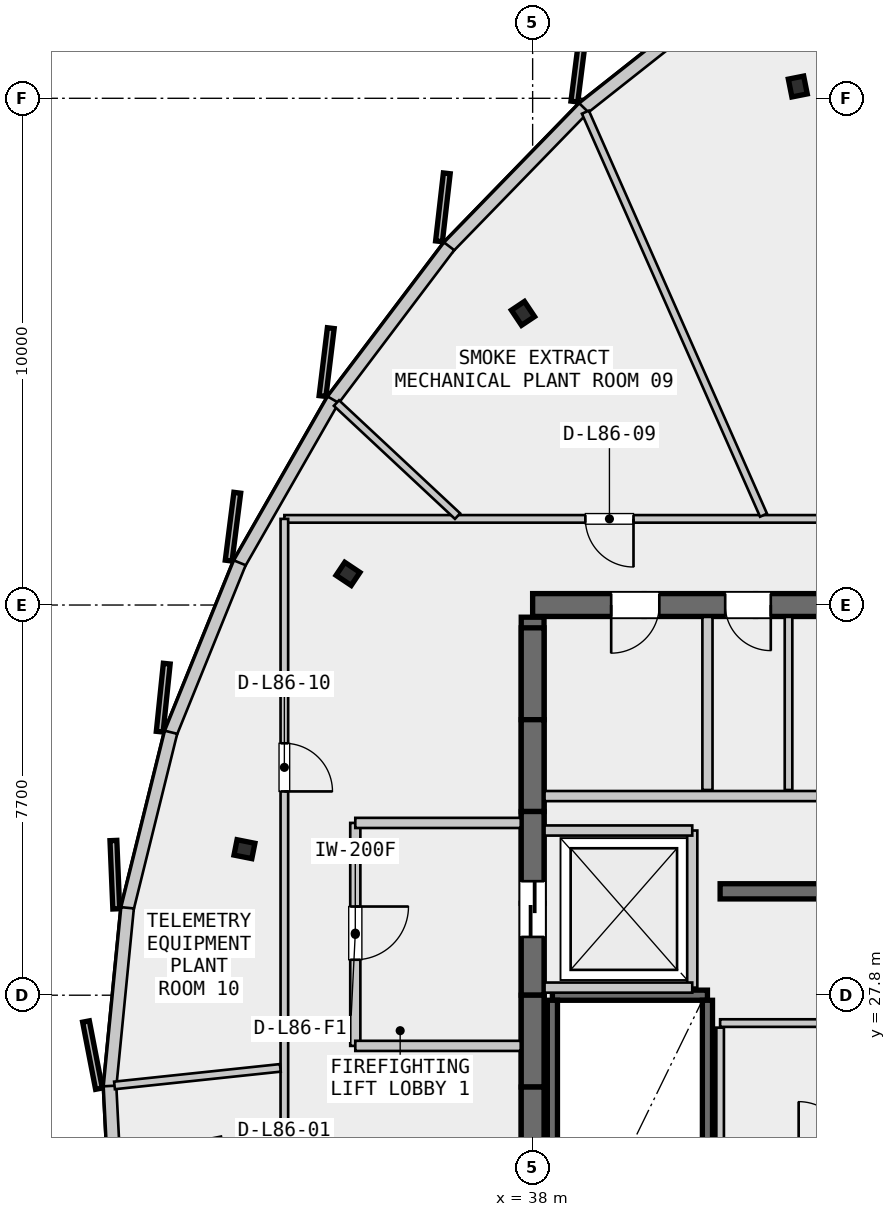
"""IFC4 building model, lengths in metres.
Left out: names, types, materials, properties, quantities, classifications, styles, units other than length and angle.
Written with IfcOpenShell. Run it as: python <this file> out.ifc"""

import sys

from ifc_helpers import new_model, si_unit, direction, frame, frame_2d, origin, origin_2d, place, context, subcontext, project, spatial, rectangle, i_section, extrude, source, transform, mapped, element, fill, save


model = new_model("IFC4")
c1 = context("Model", 3, precision=1e-05, world=origin(), true_north=direction((0.0, 1.0)))
c2 = subcontext(c1, "Body", "Model", "MODEL_VIEW")
j1 = project(units=[si_unit("LENGTHUNIT", "METRE"), si_unit("PLANEANGLEUNIT", "RADIAN")], contexts=[c1])
p1 = place(None, origin())
s1 = spatial("IfcSite", under=j1, at=p1, CompositionType="ELEMENT")
p2 = place(p1, origin())
s2 = spatial("IfcBuilding", under=s1, at=p2, CompositionType="ELEMENT")
p3 = place(p2, frame((0.0, 0.0, 324.3)))
s3 = spatial("IfcBuildingStorey", under=s2, at=p3, CompositionType="ELEMENT", Elevation=324.3)
p4 = place(p3, frame((55.6, 35.5, 0.0), z_axis=(0.0, 0.0, 1.0), x_axis=(-1.0, 0.0, 0.0)))
e1 = element("IfcWall", 1, at=p4, inside=s3, PredefinedType="SHEAR", context=c2, shape_type="SweptSolid", body=[
    extrude(rectangle(XDim=17.6, YDim=0.45, at=frame_2d((8.8, 0.0))), origin(), (0.0, 0.0, 1.0), 4.2),
])
p5 = place(p4, frame((8.05, 0.0, 0.0)))
e2 = element("IfcOpeningElement", 2, at=p5, cuts=e1, PredefinedType="OPENING", context=c2, shape_type="SweptSolid", body=[
    extrude(rectangle(XDim=1.5, YDim=2.2, at=frame_2d((0.75, 1.1))), frame((0.0, 0.235, 0.0), z_axis=(0.0, -1.0, 0.0), x_axis=(1.0, 0.0, 0.0)), (0.0, 0.0, 1.0), 0.47),
])
p6 = place(p4, frame((15.1, 0.0, 0.0)))
e3 = element("IfcOpeningElement", 3, at=p6, cuts=e1, PredefinedType="OPENING", context=c2, shape_type="SweptSolid", body=[
    extrude(rectangle(XDim=0.95, YDim=2.15, at=frame_2d((0.475, 1.075))), frame((0.0, 0.235, 0.0), z_axis=(0.0, -1.0, 0.0), x_axis=(1.0, 0.0, 0.0)), (0.0, 0.0, 1.0), 0.47),
])
p7 = place(p4, frame((12.9, 0.0, 0.0)))
e4 = element("IfcOpeningElement", 4, at=p7, cuts=e1, PredefinedType="OPENING", context=c2, shape_type="SweptSolid", body=[
    extrude(rectangle(XDim=0.9, YDim=2.15, at=frame_2d((0.45, 1.075))), frame((0.0, 0.235, 0.0), z_axis=(0.0, -1.0, 0.0), x_axis=(1.0, 0.0, 0.0)), (0.0, 0.0, 1.0), 0.47),
])
p8 = place(p4, frame((10.6, 0.0, 0.0)))
e5 = element("IfcOpeningElement", 5, at=p8, cuts=e1, PredefinedType="OPENING", context=c2, shape_type="SweptSolid", body=[
    extrude(rectangle(XDim=0.95, YDim=2.15, at=frame_2d((0.475, 1.075))), frame((0.0, 0.235, 0.0), z_axis=(0.0, -1.0, 0.0), x_axis=(1.0, 0.0, 0.0)), (0.0, 0.0, 1.0), 0.47),
])
p9 = place(p3, frame((38.0, 35.26, 0.0), z_axis=(0.0, 0.0, 1.0), x_axis=(0.0, -1.0, 0.0)))
e6 = element("IfcWall", 6, at=p9, inside=s3, PredefinedType="SHEAR", context=c2, shape_type="SweptSolid", body=[
    extrude(rectangle(XDim=14.92, YDim=0.45, at=frame_2d((7.46, 0.0))), origin(), (0.0, 0.0, 1.0), 4.2),
])
p10 = place(p9, frame((5.21, 0.0, 0.0)))
e7 = element("IfcOpeningElement", 7, at=p10, cuts=e6, PredefinedType="OPENING", context=c2, shape_type="SweptSolid", body=[
    extrude(rectangle(XDim=1.1, YDim=2.2, at=frame_2d((0.55, 1.1))), frame((0.0, 0.235, 0.0), z_axis=(0.0, -1.0, 0.0), x_axis=(1.0, 0.0, 0.0)), (0.0, 0.0, 1.0), 0.47),
])
p11 = place(p3, frame((41.7, 29.85, 0.0), z_axis=(0.0, 0.0, 1.0), x_axis=(1.0, 0.0, 0.0)))
e8 = element("IfcWall", 8, at=p11, inside=s3, PredefinedType="SHEAR", context=c2, shape_type="SweptSolid", body=[
    extrude(rectangle(XDim=4.25, YDim=0.3, at=frame_2d((2.125, 0.0))), origin(), (0.0, 0.0, 1.0), 4.2),
])
m1 = source(origin(), c2, "Body", "SweptSolid", [
    extrude(i_section(OverallWidth=0.309, OverallDepth=0.359, WebThickness=0.016, FlangeThickness=0.026, FilletRadius=0.027, at=origin_2d()), origin(), (0.0, 0.0, 1.0), 10.751),
])
p12 = place(p3, frame((43.233, 45.732, 0.0), z_axis=(0.0, 0.0, 1.0), x_axis=(-0.195090322016, 0.980785280403, 0.0)))
e9 = element("IfcColumn", 9, at=p12, inside=s3, PredefinedType="COLUMN", context=c2, shape_type="MappedRepresentation", body=[
    mapped(m1, transform((0.0, 0.0, 0.0), scale=1.0)),
])
m2 = source(origin(), c2, "Body", "SweptSolid", [
    extrude(i_section(OverallWidth=0.309, OverallDepth=0.359, WebThickness=0.016, FlangeThickness=0.026, FilletRadius=0.027, at=origin_2d()), origin(), (0.0, 0.0, 1.0), 9.653),
])
p13 = place(p3, frame((37.81, 41.255, 0.0), z_axis=(0.0, 0.0, 1.0), x_axis=(-0.55557023302, 0.831469612303, 0.0)))
e10 = element("IfcColumn", 10, at=p13, inside=s3, PredefinedType="COLUMN", context=c2, shape_type="MappedRepresentation", body=[
    mapped(m2, transform((0.0, 0.0, 0.0), scale=1.0)),
])
m3 = source(origin(), c2, "Body", "SweptSolid", [
    extrude(i_section(OverallWidth=0.309, OverallDepth=0.359, WebThickness=0.016, FlangeThickness=0.026, FilletRadius=0.027, at=origin_2d()), origin(), (0.0, 0.0, 1.0), 8.552),
])
p14 = place(p3, frame((34.356, 36.115, 0.0), z_axis=(0.0, 0.0, 1.0), x_axis=(-0.831469612303, 0.55557023302, 0.0)))
e11 = element("IfcColumn", 11, at=p14, inside=s3, PredefinedType="COLUMN", context=c2, shape_type="MappedRepresentation", body=[
    mapped(m3, transform((0.0, 0.0, 0.0), scale=1.0)),
])
m4 = source(origin(), c2, "Body", "SweptSolid", [
    extrude(i_section(OverallWidth=0.309, OverallDepth=0.359, WebThickness=0.016, FlangeThickness=0.026, FilletRadius=0.027, at=origin_2d()), origin(), (0.0, 0.0, 1.0), 7.479),
])
p15 = place(p3, frame((32.312, 30.682, 0.0), z_axis=(0.0, 0.0, 1.0), x_axis=(-0.980785280403, 0.195090322016, 0.0)))
e12 = element("IfcColumn", 12, at=p15, inside=s3, PredefinedType="COLUMN", context=c2, shape_type="MappedRepresentation", body=[
    mapped(m4, transform((0.0, 0.0, 0.0), scale=1.0)),
])
p16 = place(p3, frame((44.6, 35.5, 4.2), z_axis=(0.0, 0.0, 1.0), x_axis=(-1.0, 0.0, 0.0)))
e13 = element("IfcWall", 13, at=p16, inside=s3, PredefinedType="SHEAR", context=c2, shape_type="SweptSolid", body=[
    extrude(rectangle(XDim=2.2, YDim=0.45, at=frame_2d((1.1, 0.0))), origin(), (0.0, 0.0, 1.0), 4.713),
])
p17 = place(p3, frame((42.4, 35.5, 4.2), z_axis=(0.0, 0.0, 1.0), x_axis=(-1.0, 0.0, 0.0)))
e14 = element("IfcWall", 14, at=p17, inside=s3, PredefinedType="SHEAR", context=c2, shape_type="SweptSolid", body=[
    extrude(rectangle(XDim=2.2, YDim=0.45, at=frame_2d((1.1, 0.0))), origin(), (0.0, 0.0, 1.0), 4.587),
])
p18 = place(p3, frame((40.2, 35.5, 4.2), z_axis=(0.0, 0.0, 1.0), x_axis=(-1.0, 0.0, 0.0)))
e15 = element("IfcWall", 15, at=p18, inside=s3, PredefinedType="SHEAR", context=c2, shape_type="SweptSolid", body=[
    extrude(rectangle(XDim=2.2, YDim=0.45, at=frame_2d((1.1, 0.0))), origin(), (0.0, 0.0, 1.0), 4.462),
])
p19 = place(p3, frame((38.0, 35.05, 4.2), z_axis=(0.0, 0.0, 1.0), x_axis=(0.0, -1.0, 0.0)))
e16 = element("IfcWall", 16, at=p19, inside=s3, PredefinedType="SHEAR", context=c2, shape_type="SweptSolid", body=[
    extrude(rectangle(XDim=1.812, YDim=0.45, at=frame_2d((0.906, 0.0))), origin(), (0.0, 0.0, 1.0), 4.064),
])
p20 = place(p3, frame((38.0, 33.238, 4.2), z_axis=(0.0, 0.0, 1.0), x_axis=(0.0, -1.0, 0.0)))
e17 = element("IfcWall", 17, at=p20, inside=s3, PredefinedType="SHEAR", context=c2, shape_type="SweptSolid", body=[
    extrude(rectangle(XDim=1.812, YDim=0.45, at=frame_2d((0.906, 0.0))), origin(), (0.0, 0.0, 1.0), 3.745),
])
p21 = place(p3, frame((38.0, 31.425, 4.2), z_axis=(0.0, 0.0, 1.0), x_axis=(0.0, -1.0, 0.0)))
e18 = element("IfcWall", 18, at=p21, inside=s3, PredefinedType="SHEAR", context=c2, shape_type="SweptSolid", body=[
    extrude(rectangle(XDim=1.812, YDim=0.45, at=frame_2d((0.906, 0.0))), origin(), (0.0, 0.0, 1.0), 3.426),
])
p22 = place(p3, frame((38.0, 29.613, 4.2), z_axis=(0.0, 0.0, 1.0), x_axis=(0.0, -1.0, 0.0)))
e19 = element("IfcWall", 19, at=p22, inside=s3, PredefinedType="SHEAR", context=c2, shape_type="SweptSolid", body=[
    extrude(rectangle(XDim=1.812, YDim=0.45, at=frame_2d((0.906, 0.0))), origin(), (0.0, 0.0, 1.0), 3.107),
])
p23 = place(p3, frame((38.0, 27.8, 4.2), z_axis=(0.0, 0.0, 1.0), x_axis=(0.0, -1.0, 0.0)))
e20 = element("IfcWall", 20, at=p23, inside=s3, PredefinedType="SHEAR", context=c2, shape_type="SweptSolid", body=[
    extrude(rectangle(XDim=1.812, YDim=0.45, at=frame_2d((0.906, 0.0))), origin(), (0.0, 0.0, 1.0), 2.788),
])
p24 = place(p3, frame((38.0, 25.988, 4.2), z_axis=(0.0, 0.0, 1.0), x_axis=(0.0, -1.0, 0.0)))
e21 = element("IfcWall", 21, at=p24, inside=s3, PredefinedType="SHEAR", context=c2, shape_type="SweptSolid", body=[
    extrude(rectangle(XDim=1.812, YDim=0.45, at=frame_2d((0.906, 0.0))), origin(), (0.0, 0.0, 1.0), 2.469),
])
p25 = place(p3, frame((41.944, 47.628, 10.458), z_axis=(0.0, 0.0, 1.0), x_axis=(-0.784641383656, -0.619949916569, 0.0)))
e22 = element("IfcWall", 22, at=p25, inside=s3, PredefinedType="PARAPET", context=c2, shape_type="SweptSolid", body=[
    extrude(rectangle(XDim=3.755, YDim=0.25, at=frame_2d((1.877, 0.0))), origin(), (0.0, 0.0, 1.0), 0.309),
])
p26 = place(p3, frame((39.011, 45.313, 9.822), z_axis=(0.0, 0.0, 1.0), x_axis=(-0.69680348459, -0.717262088684, 0.0)))
e23 = element("IfcWall", 23, at=p26, inside=s3, PredefinedType="PARAPET", context=c2, shape_type="SweptSolid", body=[
    extrude(rectangle(XDim=3.831, YDim=0.25, at=frame_2d((1.915, 0.0))), origin(), (0.0, 0.0, 1.0), 0.338),
])
p27 = place(p3, frame((36.353, 42.579, 9.155), z_axis=(0.0, 0.0, 1.0), x_axis=(-0.602630134159, -0.798020627179, 0.0)))
e24 = element("IfcWall", 24, at=p27, inside=s3, PredefinedType="PARAPET", context=c2, shape_type="SweptSolid", body=[
    extrude(rectangle(XDim=3.812, YDim=0.25, at=frame_2d((1.906, 0.0))), origin(), (0.0, 0.0, 1.0), 0.353),
])
p28 = place(p3, frame((34.065, 39.551, 8.48), z_axis=(0.0, 0.0, 1.0), x_axis=(-0.496977942781, -0.867763172985, 0.0)))
e25 = element("IfcWall", 25, at=p28, inside=s3, PredefinedType="PARAPET", context=c2, shape_type="SweptSolid", body=[
    extrude(rectangle(XDim=3.728, YDim=0.25, at=frame_2d((1.864, 0.0))), origin(), (0.0, 0.0, 1.0), 0.357),
])
p29 = place(p3, frame((32.221, 36.333, 7.81), z_axis=(0.0, 0.0, 1.0), x_axis=(-0.375539569533, -0.926806361499, 0.0)))
e26 = element("IfcWall", 26, at=p29, inside=s3, PredefinedType="PARAPET", context=c2, shape_type="SweptSolid", body=[
    extrude(rectangle(XDim=3.629, YDim=0.25, at=frame_2d((1.814, 0.0))), origin(), (0.0, 0.0, 1.0), 0.355),
])
p30 = place(p3, frame((30.864, 32.989, 7.148), z_axis=(0.0, 0.0, 1.0), x_axis=(-0.240198045356, -0.970723904623, 0.0)))
e27 = element("IfcWall", 27, at=p30, inside=s3, PredefinedType="PARAPET", context=c2, shape_type="SweptSolid", body=[
    extrude(rectangle(XDim=3.589, YDim=0.25, at=frame_2d((1.794, 0.0))), origin(), (0.0, 0.0, 1.0), 0.351),
])
p31 = place(p3, frame((30.005, 29.525, 6.506), z_axis=(0.0, 0.0, 1.0), x_axis=(-0.097762221924, -0.995209800979, 0.0)))
e28 = element("IfcWall", 28, at=p31, inside=s3, PredefinedType="PARAPET", context=c2, shape_type="SweptSolid", body=[
    extrude(rectangle(XDim=3.554, YDim=0.25, at=frame_2d((1.777, 0.0))), origin(), (0.0, 0.0, 1.0), 0.341),
])
p32 = place(p3, frame((29.658, 26.009, 5.903), z_axis=(0.0, 0.0, 1.0), x_axis=(0.050978363746, -0.9986997579, 0.0)))
e29 = element("IfcWall", 29, at=p32, inside=s3, PredefinedType="PARAPET", context=c2, shape_type="SweptSolid", body=[
    extrude(rectangle(XDim=3.487, YDim=0.25, at=frame_2d((1.743, 0.0))), origin(), (0.0, 0.0, 1.0), 0.321),
])
p33 = place(p3, frame((38.39, 27.8, 0.0), z_axis=(0.0, 0.0, 1.0), x_axis=(1.0, 0.0, 0.0)))
e30 = element("IfcWall", 30, at=p33, inside=s3, PredefinedType="SHEAR", context=c2, shape_type="SweptSolid", body=[
    extrude(rectangle(XDim=3.06, YDim=0.2, at=frame_2d((1.53, 0.0))), origin(), (0.0, 0.0, 1.0), 4.2),
])
for number, where, z_axis, x_axis in (
    (31, (41.45, 27.7, 0.0), (0.0, 0.0, 1.0), (0.0, -1.0, 0.0)),
    (32, (38.39, 20.35, 0.0), (0.0, 0.0, 1.0), (0.0, 1.0, 0.0)),
):
    element("IfcWall", number, at=place(p3, frame(where, z_axis=z_axis, x_axis=x_axis)), inside=s3, PredefinedType="SHEAR", context=c2, shape_type="SweptSolid", body=[
        extrude(rectangle(XDim=7.35, YDim=0.2, at=frame_2d((3.675, 0.0))), origin(), (0.0, 0.0, 1.0), 4.2),
    ])
p34 = place(p3, frame((41.15, 27.95, 0.0), z_axis=(0.0, 0.0, 1.0), x_axis=(0.0, 1.0, 0.0)))
e33 = element("IfcWall", 33, at=p34, inside=s3, PredefinedType="PARTITIONING", context=c2, shape_type="SweptSolid", body=[
    extrude(rectangle(XDim=3.1, YDim=0.2, at=frame_2d((1.55, 0.0))), origin(), (0.0, 0.0, 1.0), 2.76),
])
for number, where, z_axis, x_axis in (
    (34, (38.235, 27.95, 0.0), (0.0, 0.0, 1.0), (1.0, 0.0, 0.0)),
    (35, (38.235, 31.05, 0.0), (0.0, 0.0, 1.0), (1.0, 0.0, 0.0)),
):
    element("IfcWall", number, at=place(p3, frame(where, z_axis=z_axis, x_axis=x_axis)), inside=s3, PredefinedType="PARTITIONING", context=c2, shape_type="SweptSolid", body=[
        extrude(rectangle(XDim=2.915, YDim=0.2, at=frame_2d((1.458, 0.0))), origin(), (0.0, 0.0, 1.0), 3.49),
    ])
p35 = place(p3, frame((34.5, 31.2, 0.0), z_axis=(0.0, 0.0, 1.0), x_axis=(0.0, -1.0, 0.0)))
e36 = element("IfcWall", 36, at=p35, inside=s3, PredefinedType="PARTITIONING", context=c2, shape_type="SweptSolid", body=[
    extrude(rectangle(XDim=4.4, YDim=0.2, at=frame_2d((2.2, 0.0))), origin(), (0.0, 0.0, 1.0), 3.49),
])
p36 = place(p35, frame((1.65, 0.0, 0.0)))
e37 = element("IfcOpeningElement", 37, at=p36, cuts=e36, PredefinedType="OPENING", context=c2, shape_type="SweptSolid", body=[
    extrude(rectangle(XDim=1.05, YDim=2.15, at=frame_2d((0.525, 1.075))), frame((0.0, 0.11, 0.0), z_axis=(0.0, -1.0, 0.0), x_axis=(1.0, 0.0, 0.0)), (0.0, 0.0, 1.0), 0.22),
])
for number, where, z_axis, x_axis in (
    (38, (34.5, 26.8, 0.0), (0.0, 0.0, 1.0), (1.0, 0.0, 0.0)),
    (39, (34.5, 31.2, 0.0), (0.0, 0.0, 1.0), (1.0, 0.0, 0.0)),
):
    element("IfcWall", number, at=place(p3, frame(where, z_axis=z_axis, x_axis=x_axis)), inside=s3, PredefinedType="PARTITIONING", context=c2, shape_type="SweptSolid", body=[
        extrude(rectangle(XDim=3.265, YDim=0.2, at=frame_2d((1.632, 0.0))), origin(), (0.0, 0.0, 1.0), 3.49),
    ])
p37 = place(p3, frame((41.7, 27.25, 0.0), z_axis=(0.0, 0.0, 1.0), x_axis=(1.0, 0.0, 0.0)))
e40 = element("IfcWall", 40, at=p37, inside=s3, PredefinedType="PARTITIONING", context=c2, shape_type="SweptSolid", body=[
    extrude(rectangle(XDim=4.25, YDim=0.15, at=frame_2d((2.125, 0.0))), origin(), (0.0, 0.0, 1.0), 2.76),
])
p38 = place(p3, frame((41.7, 24.92, 0.0), z_axis=(0.0, 0.0, 1.0), x_axis=(0.0, 1.0, 0.0)))
e41 = element("IfcWall", 41, at=p38, inside=s3, PredefinedType="PARTITIONING", context=c2, shape_type="SweptSolid", body=[
    extrude(rectangle(XDim=2.24, YDim=0.15, at=frame_2d((1.12, 0.0))), origin(), (0.0, 0.0, 1.0), 2.76),
])
p39 = place(p3, frame((41.45, 31.85, 0.0), z_axis=(0.0, 0.0, 1.0), x_axis=(0.0, 1.0, 0.0)))
e42 = element("IfcWall", 42, at=p39, inside=s3, PredefinedType="PARTITIONING", context=c2, shape_type="SweptSolid", body=[
    extrude(rectangle(XDim=3.415, YDim=0.2, at=frame_2d((1.708, 0.0))), origin(), (0.0, 0.0, 1.0), 3.49),
])
p40 = place(p3, frame((38.235, 31.73, 0.0), z_axis=(0.0, 0.0, 1.0), x_axis=(1.0, 0.0, 0.0)))
e43 = element("IfcWall", 43, at=p40, inside=s3, PredefinedType="PARTITIONING", context=c2, shape_type="SweptSolid", body=[
    extrude(rectangle(XDim=7.565, YDim=0.2, at=frame_2d((3.782, 0.0))), origin(), (0.0, 0.0, 1.0), 2.76),
])
p41 = place(p3, frame((43.05, 31.85, 0.0), z_axis=(0.0, 0.0, 1.0), x_axis=(0.0, 1.0, 0.0)))
e44 = element("IfcWall", 44, at=p41, inside=s3, PredefinedType="PLUMBINGWALL", context=c2, shape_type="SweptSolid", body=[
    extrude(rectangle(XDim=3.415, YDim=0.15, at=frame_2d((1.708, 0.0))), origin(), (0.0, 0.0, 1.0), 3.49),
])
p42 = place(p3, frame((60.5, 37.2, 0.0), z_axis=(0.0, 0.0, 1.0), x_axis=(-1.0, 0.0, 0.0)))
e45 = element("IfcWall", 45, at=p42, inside=s3, PredefinedType="PARTITIONING", context=c2, shape_type="SweptSolid", body=[
    extrude(rectangle(XDim=27.4, YDim=0.15, at=frame_2d((13.7, 0.0))), origin(), (0.0, 0.0, 1.0), 3.49),
])
p43 = place(p42, frame((4.458, 0.0, 0.0)))
e46 = element("IfcOpeningElement", 46, at=p43, cuts=e45, PredefinedType="OPENING", context=c2, shape_type="SweptSolid", body=[
    extrude(rectangle(XDim=0.95, YDim=2.15, at=frame_2d((0.475, 1.075))), frame((0.0, 0.085, 0.0), z_axis=(0.0, -1.0, 0.0), x_axis=(1.0, 0.0, 0.0)), (0.0, 0.0, 1.0), 0.17),
])
p44 = place(p42, frame((13.122, 0.0, 0.0)))
e47 = element("IfcOpeningElement", 47, at=p44, cuts=e45, PredefinedType="OPENING", context=c2, shape_type="SweptSolid", body=[
    extrude(rectangle(XDim=0.95, YDim=2.15, at=frame_2d((0.475, 1.075))), frame((0.0, 0.085, 0.0), z_axis=(0.0, -1.0, 0.0), x_axis=(1.0, 0.0, 0.0)), (0.0, 0.0, 1.0), 0.17),
])
p45 = place(p42, frame((20.51, 0.0, 0.0)))
e48 = element("IfcOpeningElement", 48, at=p45, cuts=e45, PredefinedType="OPENING", context=c2, shape_type="SweptSolid", body=[
    extrude(rectangle(XDim=0.95, YDim=2.15, at=frame_2d((0.475, 1.075))), frame((0.0, 0.085, 0.0), z_axis=(0.0, -1.0, 0.0), x_axis=(1.0, 0.0, 0.0)), (0.0, 0.0, 1.0), 0.17),
])
p46 = place(p3, frame((33.1, 37.2, 0.0), z_axis=(0.0, 0.0, 1.0), x_axis=(0.0, -1.0, 0.0)))
e49 = element("IfcWall", 49, at=p46, inside=s3, PredefinedType="PARTITIONING", context=c2, shape_type="SweptSolid", body=[
    extrude(rectangle(XDim=18.8, YDim=0.15, at=frame_2d((9.4, 0.0))), origin(), (0.0, 0.0, 1.0), 3.49),
])
p47 = place(p46, frame((13.247, 0.0, 0.0)))
e50 = element("IfcOpeningElement", 50, at=p47, cuts=e49, PredefinedType="OPENING", context=c2, shape_type="SweptSolid", body=[
    extrude(rectangle(XDim=0.95, YDim=2.15, at=frame_2d((0.475, 1.075))), frame((0.0, 0.085, 0.0), z_axis=(0.0, -1.0, 0.0), x_axis=(1.0, 0.0, 0.0)), (0.0, 0.0, 1.0), 0.17),
])
p48 = place(p46, frame((4.428, 0.0, 0.0)))
e51 = element("IfcOpeningElement", 51, at=p48, cuts=e49, PredefinedType="OPENING", context=c2, shape_type="SweptSolid", body=[
    extrude(rectangle(XDim=0.95, YDim=2.15, at=frame_2d((0.475, 1.075))), frame((0.0, 0.085, 0.0), z_axis=(0.0, -1.0, 0.0), x_axis=(1.0, 0.0, 0.0)), (0.0, 0.0, 1.0), 0.17),
])
p49 = place(p3, frame((33.021, 26.366, 0.0), z_axis=(0.0, 0.0, 1.0), x_axis=(-0.994443901879, -0.105267877416, 0.0)))
e52 = element("IfcWall", 52, at=p49, inside=s3, PredefinedType="PARTITIONING", context=c2, shape_type="SweptSolid", body=[
    extrude(rectangle(XDim=3.291, YDim=0.15, at=frame_2d((1.646, 0.0))), origin(), (0.0, 0.0, 1.0), 3.49),
])
p50 = place(p3, frame((42.556, 37.273, 0.0), z_axis=(0.0, 0.0, 1.0), x_axis=(-0.404280205645, 0.914635181547, 0.0)))
e53 = element("IfcWall", 53, at=p50, inside=s3, PredefinedType="PARTITIONING", context=c2, shape_type="SweptSolid", body=[
    extrude(rectangle(XDim=8.695, YDim=0.15, at=frame_2d((4.348, 0.0))), origin(), (0.0, 0.0, 1.0), 3.49),
])
p51 = place(p3, frame((36.518, 37.255, 0.0), z_axis=(0.0, 0.0, 1.0), x_axis=(-0.730921171685, 0.682461896946, 0.0)))
e54 = element("IfcWall", 54, at=p51, inside=s3, PredefinedType="PARTITIONING", context=c2, shape_type="SweptSolid", body=[
    extrude(rectangle(XDim=3.27, YDim=0.15, at=frame_2d((1.635, 0.0))), origin(), (0.0, 0.0, 1.0), 3.49),
])
m5 = source(origin(), c2, "Body", "SweptSolid", [
    extrude(rectangle(XDim=1.1, YDim=2.2, at=frame_2d((0.55, 1.1))), frame((0.0, 0.025, 0.0), z_axis=(0.0, -1.0, 0.0), x_axis=(1.0, 0.0, 0.0)), (0.0, 0.0, 1.0), 0.05),
])
p52 = place(p10, origin())
e55 = element("IfcDoor", 55, at=p52, inside=s3, OperationType="SLIDING_TO_LEFT", PredefinedType="DOOR", context=c2, shape_type="MappedRepresentation", body=[
    mapped(m5, transform((0.0, 0.0, 0.0), scale=1.0)),
])
fill(e7, e55)
m6 = source(origin(), c2, "Body", "SweptSolid", [
    extrude(rectangle(XDim=0.95, YDim=2.15, at=frame_2d((0.475, 1.075))), frame((0.0, 0.025, 0.0), z_axis=(0.0, -1.0, 0.0), x_axis=(1.0, 0.0, 0.0)), (0.0, 0.0, 1.0), 0.05),
])
p53 = place(p6, origin())
e56 = element("IfcDoor", 56, at=p53, inside=s3, OperationType="SINGLE_SWING_RIGHT", PredefinedType="DOOR", context=c2, shape_type="MappedRepresentation", body=[
    mapped(m6, transform((0.0, 0.0, 0.0), scale=1.0)),
])
fill(e3, e56)
m7 = source(origin(), c2, "Body", "SweptSolid", [
    extrude(rectangle(XDim=0.9, YDim=2.15, at=frame_2d((0.45, 1.075))), frame((0.0, 0.025, 0.0), z_axis=(0.0, -1.0, 0.0), x_axis=(1.0, 0.0, 0.0)), (0.0, 0.0, 1.0), 0.05),
])
p54 = place(p7, origin())
e57 = element("IfcDoor", 57, at=p54, inside=s3, OperationType="SINGLE_SWING_LEFT", PredefinedType="DOOR", context=c2, shape_type="MappedRepresentation", body=[
    mapped(m7, transform((0.0, 0.0, 0.0), scale=1.0)),
])
fill(e4, e57)
m8 = source(origin(), c2, "Body", "SweptSolid", [
    extrude(rectangle(XDim=1.05, YDim=2.15, at=frame_2d((0.525, 1.075))), frame((0.0, 0.025, 0.0), z_axis=(0.0, -1.0, 0.0), x_axis=(1.0, 0.0, 0.0)), (0.0, 0.0, 1.0), 0.05),
])
p55 = place(p36, origin())
e58 = element("IfcDoor", 58, at=p55, inside=s3, OperationType="SINGLE_SWING_LEFT", PredefinedType="DOOR", context=c2, shape_type="MappedRepresentation", body=[
    mapped(m8, transform((0.0, 0.0, 0.0), scale=1.0)),
])
fill(e37, e58)
p56 = place(p45, origin())
e59 = element("IfcDoor", 59, at=p56, inside=s3, OperationType="SINGLE_SWING_LEFT", PredefinedType="DOOR", context=c2, shape_type="MappedRepresentation", body=[
    mapped(m6, transform((0.0, 0.0, 0.0), scale=1.0)),
])
fill(e48, e59)
p57 = place(p48, origin())
e60 = element("IfcDoor", 60, at=p57, inside=s3, OperationType="SINGLE_SWING_RIGHT", PredefinedType="DOOR", context=c2, shape_type="MappedRepresentation", body=[
    mapped(m6, transform((0.0, 0.0, 0.0), scale=1.0)),
])
fill(e51, e60)
save(model, sys.argv[1])
